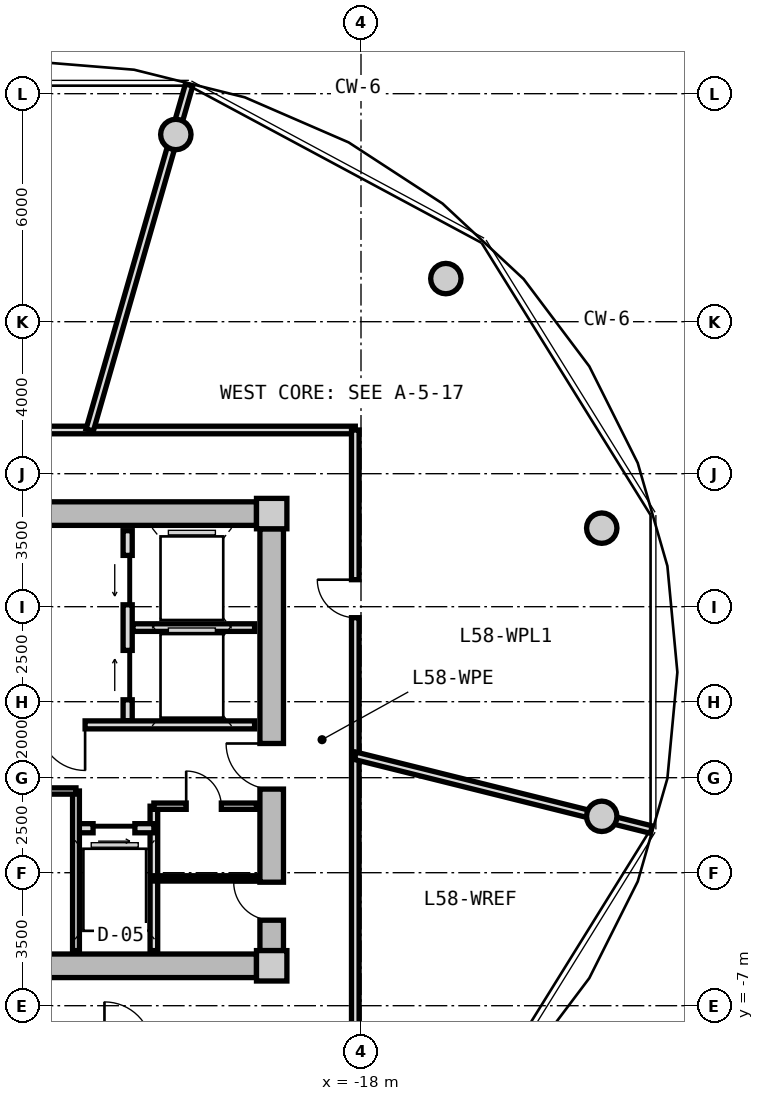
"""IFC4 building model, lengths in metres.
Left out: names, types, materials, properties, quantities, classifications, styles, units other than length and angle.
Written with IfcOpenShell. Run it as: python <this file> out.ifc"""

import sys

from ifc_helpers import new_model, si_unit, direction, frame, frame_2d, origin, origin_2d, place, context, subcontext, project, spatial, rectangle, circle, extrude, source, transform, mapped, element, fill, save


model = new_model("IFC4")
c1 = context("Model", 3, precision=1e-05, world=origin(), true_north=direction((0.0, 1.0)))
c2 = subcontext(c1, "Body", "Model", "MODEL_VIEW")
j1 = project(units=[si_unit("LENGTHUNIT", "METRE"), si_unit("PLANEANGLEUNIT", "RADIAN")], contexts=[c1])
p1 = place(None, origin())
s1 = spatial("IfcSite", under=j1, at=p1, CompositionType="ELEMENT")
p2 = place(p1, origin())
s2 = spatial("IfcBuilding", under=s1, at=p2, CompositionType="ELEMENT")
p3 = place(p2, frame((0.0, 0.0, 186.15)))
s3 = spatial("IfcBuildingStorey", under=s2, at=p3, CompositionType="ELEMENT", Elevation=186.15)
m1 = source(origin(), c2, "Body", "SweptSolid", [
    extrude(rectangle(XDim=0.8, YDim=0.8, at=origin_2d()), origin(), (0.0, 0.0, 1.0), 4.5),
])
for number, where, z_axis, x_axis in (
    (1, (-20.35, -5.95, 0.0), (0.0, 0.0, 1.0), (1.0, 0.0, 0.0)),
    (2, (-20.35, 5.95, 0.0), (0.0, 0.0, 1.0), (1.0, 0.0, 0.0)),
):
    element("IfcColumn", number, at=place(p3, frame(where, z_axis=z_axis, x_axis=x_axis)), inside=s3, PredefinedType="COLUMN", context=c2, shape_type="MappedRepresentation", body=[
        mapped(m1, transform((0.0, 0.0, 0.0), x_axis=(1.0, 0.0, 0.0), y_axis=(0.0, 1.0, 0.0), z_axis=(0.0, 0.0, 1.0), scale=1.0)),
    ])
m2 = source(origin(), c2, "Body", "SweptSolid", [
    extrude(rectangle(XDim=14.5, YDim=0.62, at=frame_2d((7.25, 0.0))), origin(), (0.0, 0.0, 1.0), 4.08),
])
for number, where, z_axis, x_axis in (
    (3, (-35.25, 5.95, 0.0), (0.0, 0.0, 1.0), (1.0, 0.0, 0.0)),
    (4, (-20.75, -5.95, 0.0), (0.0, 0.0, 1.0), (-1.0, 0.0, 0.0)),
):
    element("IfcWall", number, at=place(p3, frame(where, z_axis=z_axis, x_axis=x_axis)), inside=s3, PredefinedType="SHEAR", context=c2, shape_type="MappedRepresentation", body=[
        mapped(m2, transform((0.0, 0.0, 0.0), x_axis=(1.0, 0.0, 0.0), y_axis=(0.0, 1.0, 0.0), z_axis=(0.0, 0.0, 1.0), scale=1.0)),
    ])
m3 = source(origin(), c2, "Body", "SweptSolid", [
    extrude(rectangle(XDim=11.1, YDim=0.62, at=frame_2d((5.55, 0.0))), origin(), (0.0, 0.0, 1.0), 4.08),
])
p4 = place(p3, frame((-20.35, 5.55, 0.0), z_axis=(0.0, 0.0, 1.0), x_axis=(0.0, -1.0, 0.0)))
e5 = element("IfcWall", 5, at=p4, inside=s3, PredefinedType="SHEAR", context=c2, shape_type="MappedRepresentation", body=[
    mapped(m3, transform((0.0, 0.0, 0.0), x_axis=(1.0, 0.0, 0.0), y_axis=(0.0, 1.0, 0.0), z_axis=(0.0, 0.0, 1.0), scale=1.0)),
])
p5 = place(p4, frame((5.65, 0.0, 0.0)))
e6 = element("IfcOpeningElement", 6, at=p5, cuts=e5, PredefinedType="OPENING", context=c2, shape_type="SweptSolid", body=[
    extrude(rectangle(XDim=1.2, YDim=2.15, at=frame_2d((0.6, 1.075))), frame((0.0, 0.32, 0.0), z_axis=(0.0, -1.0, 0.0), x_axis=(1.0, 0.0, 0.0)), (0.0, 0.0, 1.0), 0.64),
])
p6 = place(p4, frame((9.3, 0.0, 0.0)))
e7 = element("IfcOpeningElement", 7, at=p6, cuts=e5, PredefinedType="OPENING", context=c2, shape_type="SweptSolid", body=[
    extrude(rectangle(XDim=1.0, YDim=2.1, at=frame_2d((0.5, 1.05))), frame((0.0, 0.32, 0.0), z_axis=(0.0, -1.0, 0.0), x_axis=(1.0, 0.0, 0.0)), (0.0, 0.0, 1.0), 0.64),
])
m4 = source(origin(), c2, "Body", "SweptSolid", [
    extrude(circle(Radius=0.4, at=origin_2d()), origin(), (0.0, 0.0, 1.0), 4.08),
])
for number, where, z_axis, x_axis in (
    (8, (-11.665, 5.567, 0.0), (0.0, 0.0, 1.0), (1.0, 0.0, 0.0)),
    (9, (-15.767, 12.135, 0.0), (0.0, 0.0, 1.0), (1.0, 0.0, 0.0)),
    (10, (-22.873, 15.926, 0.0), (0.0, 0.0, 1.0), (1.0, 0.0, 0.0)),
    (11, (-11.665, -2.016, 0.0), (0.0, 0.0, 1.0), (1.0, 0.0, 0.0)),
):
    element("IfcColumn", number, at=place(p3, frame(where, z_axis=z_axis, x_axis=x_axis)), inside=s3, PredefinedType="COLUMN", context=c2, shape_type="MappedRepresentation", body=[
        mapped(m4, transform((0.0, 0.0, 0.0), x_axis=(1.0, 0.0, 0.0), y_axis=(0.0, 1.0, 0.0), z_axis=(0.0, 0.0, 1.0), scale=1.0)),
    ])
m5 = source(origin(), c2, "Body", "SweptSolid", [
    extrude(rectangle(XDim=5.0, YDim=0.24, at=frame_2d((2.5, 0.0))), origin(), (0.0, 0.0, 1.0), 4.065),
])
p7 = place(p3, frame((-24.14, 0.5, 0.0), z_axis=(0.0, 0.0, 1.0), x_axis=(0.0, 1.0, 0.0)))
e12 = element("IfcWall", 12, at=p7, inside=s3, PredefinedType="PARTITIONING", context=c2, shape_type="MappedRepresentation", body=[
    mapped(m5, transform((0.0, 0.0, 0.0), x_axis=(1.0, 0.0, 0.0), y_axis=(0.0, 1.0, 0.0), z_axis=(0.0, 0.0, 1.0), scale=1.0)),
])
p8 = place(p7, frame((3.05, 0.0, 0.0)))
e13 = element("IfcOpeningElement", 13, at=p8, cuts=e12, PredefinedType="OPENING", context=c2, shape_type="SweptSolid", body=[
    extrude(rectangle(XDim=1.3, YDim=2.2, at=frame_2d((0.65, 1.1))), frame((0.0, 0.13, 0.0), z_axis=(0.0, -1.0, 0.0), x_axis=(1.0, 0.0, 0.0)), (0.0, 0.0, 1.0), 0.26),
])
p9 = place(p7, frame((0.55, 0.0, 0.0)))
e14 = element("IfcOpeningElement", 14, at=p9, cuts=e12, PredefinedType="OPENING", context=c2, shape_type="SweptSolid", body=[
    extrude(rectangle(XDim=1.3, YDim=2.2, at=frame_2d((0.65, 1.1))), frame((0.0, 0.13, 0.0), z_axis=(0.0, -1.0, 0.0), x_axis=(1.0, 0.0, 0.0)), (0.0, 0.0, 1.0), 0.26),
])
m6 = source(origin(), c2, "Body", "SweptSolid", [
    extrude(rectangle(XDim=3.2, YDim=0.2, at=frame_2d((1.6, 0.0))), origin(), (0.0, 0.0, 1.0), 4.065),
])
p10 = place(p3, frame((-24.0, 2.95, 0.0), z_axis=(0.0, 0.0, 1.0), x_axis=(1.0, 0.0, 0.0)))
e15 = element("IfcWall", 15, at=p10, inside=s3, PredefinedType="PARTITIONING", context=c2, shape_type="MappedRepresentation", body=[
    mapped(m6, transform((0.0, 0.0, 0.0), x_axis=(1.0, 0.0, 0.0), y_axis=(0.0, 1.0, 0.0), z_axis=(0.0, 0.0, 1.0), scale=1.0)),
])
m7 = source(origin(), c2, "Body", "SweptSolid", [
    extrude(rectangle(XDim=6.66, YDim=0.21, at=frame_2d((3.33, 0.0))), origin(), (0.0, 0.0, 1.0), 4.065),
])
p11 = place(p3, frame((-27.46, 0.39, 0.0), z_axis=(0.0, 0.0, 1.0), x_axis=(1.0, 0.0, 0.0)))
e16 = element("IfcWall", 16, at=p11, inside=s3, PredefinedType="PARTITIONING", context=c2, shape_type="MappedRepresentation", body=[
    mapped(m7, transform((0.0, 0.0, 0.0), x_axis=(1.0, 0.0, 0.0), y_axis=(0.0, 1.0, 0.0), z_axis=(0.0, 0.0, 1.0), scale=1.0)),
])
p12 = place(p11, frame((1.0, 0.0, 0.0)))
e17 = element("IfcOpeningElement", 17, at=p12, cuts=e16, PredefinedType="OPENING", context=c2, shape_type="SweptSolid", body=[
    extrude(rectangle(XDim=1.2, YDim=2.15, at=frame_2d((0.6, 1.075))), frame((0.0, 0.115, 0.0), z_axis=(0.0, -1.0, 0.0), x_axis=(1.0, 0.0, 0.0)), (0.0, 0.0, 1.0), 0.23),
])
m8 = source(origin(), c2, "Body", "SweptSolid", [
    extrude(rectangle(XDim=3.8, YDim=0.2, at=frame_2d((1.9, 0.0))), origin(), (0.0, 0.0, 1.0), 4.065),
])
p13 = place(p3, frame((-23.45, -5.55, 0.0), z_axis=(0.0, 0.0, 1.0), x_axis=(0.0, 1.0, 0.0)))
e18 = element("IfcWall", 18, at=p13, inside=s3, PredefinedType="PARTITIONING", context=c2, shape_type="MappedRepresentation", body=[
    mapped(m8, transform((0.0, 0.0, 0.0), x_axis=(1.0, 0.0, 0.0), y_axis=(0.0, 1.0, 0.0), z_axis=(0.0, 0.0, 1.0), scale=1.0)),
])
m9 = source(origin(), c2, "Body", "SweptSolid", [
    extrude(rectangle(XDim=2.05, YDim=0.24, at=frame_2d((1.025, 0.0))), origin(), (0.0, 0.0, 1.0), 4.065),
])
p14 = place(p3, frame((-25.5, -2.33, 0.0), z_axis=(0.0, 0.0, 1.0), x_axis=(1.0, 0.0, 0.0)))
e19 = element("IfcWall", 19, at=p14, inside=s3, PredefinedType="PARTITIONING", context=c2, shape_type="MappedRepresentation", body=[
    mapped(m9, transform((0.0, 0.0, 0.0), x_axis=(1.0, 0.0, 0.0), y_axis=(0.0, 1.0, 0.0), z_axis=(0.0, 0.0, 1.0), scale=1.0)),
])
p15 = place(p14, frame((0.45, 0.0, 0.0)))
e20 = element("IfcOpeningElement", 20, at=p15, cuts=e19, PredefinedType="OPENING", context=c2, shape_type="SweptSolid", body=[
    extrude(rectangle(XDim=1.1, YDim=2.2, at=frame_2d((0.55, 1.1))), frame((0.0, 0.13, 0.0), z_axis=(0.0, -1.0, 0.0), x_axis=(1.0, 0.0, 0.0)), (0.0, 0.0, 1.0), 0.26),
])
m10 = source(origin(), c2, "Body", "SweptSolid", [
    extrude(rectangle(XDim=4.2, YDim=0.18, at=frame_2d((2.1, 0.0))), origin(), (0.0, 0.0, 1.0), 4.065),
])
p16 = place(p3, frame((-25.5, -5.55, 0.0), z_axis=(0.0, 0.0, 1.0), x_axis=(0.0, 1.0, 0.0)))
e21 = element("IfcWall", 21, at=p16, inside=s3, PredefinedType="PARTITIONING", context=c2, shape_type="MappedRepresentation", body=[
    mapped(m10, transform((0.0, 0.0, 0.0), x_axis=(1.0, 0.0, 0.0), y_axis=(0.0, 1.0, 0.0), z_axis=(0.0, 0.0, 1.0), scale=1.0)),
])
m11 = source(origin(), c2, "Body", "SweptSolid", [
    extrude(rectangle(XDim=4.77, YDim=0.165, at=frame_2d((2.385, 0.0))), origin(), (0.0, 0.0, 1.0), 4.065),
])
p17 = place(p3, frame((-30.27, -1.35, 0.0), z_axis=(0.0, 0.0, 1.0), x_axis=(1.0, 0.0, 0.0)))
e22 = element("IfcWall", 22, at=p17, inside=s3, PredefinedType="PARTITIONING", context=c2, shape_type="MappedRepresentation", body=[
    mapped(m11, transform((0.0, 0.0, 0.0), x_axis=(1.0, 0.0, 0.0), y_axis=(0.0, 1.0, 0.0), z_axis=(0.0, 0.0, 1.0), scale=1.0)),
])
p18 = place(p17, frame((1.85, 0.0, 0.0)))
e23 = element("IfcOpeningElement", 23, at=p18, cuts=e22, PredefinedType="OPENING", context=c2, shape_type="SweptSolid", body=[
    extrude(rectangle(XDim=1.0, YDim=2.1, at=frame_2d((0.5, 1.05))), frame((0.0, 0.093, 0.0), z_axis=(0.0, -1.0, 0.0), x_axis=(1.0, 0.0, 0.0)), (0.0, 0.0, 1.0), 0.185),
])
m12 = source(origin(), c2, "Body", "SweptSolid", [
    extrude(rectangle(XDim=2.7, YDim=0.165, at=frame_2d((1.35, 0.0))), origin(), (0.0, 0.0, 1.0), 4.065),
])
p19 = place(p3, frame((-23.45, -1.75, 0.0), z_axis=(0.0, 0.0, 1.0), x_axis=(1.0, 0.0, 0.0)))
e24 = element("IfcWall", 24, at=p19, inside=s3, PredefinedType="PARTITIONING", context=c2, shape_type="MappedRepresentation", body=[
    mapped(m12, transform((0.0, 0.0, 0.0), x_axis=(1.0, 0.0, 0.0), y_axis=(0.0, 1.0, 0.0), z_axis=(0.0, 0.0, 1.0), scale=1.0)),
])
p20 = place(p19, frame((0.85, 0.0, 0.0)))
e25 = element("IfcOpeningElement", 25, at=p20, cuts=e24, PredefinedType="OPENING", context=c2, shape_type="SweptSolid", body=[
    extrude(rectangle(XDim=0.925, YDim=2.1, at=frame_2d((0.462, 1.05))), frame((0.0, 0.093, 0.0), z_axis=(0.0, -1.0, 0.0), x_axis=(1.0, 0.0, 0.0)), (0.0, 0.0, 1.0), 0.185),
])
m13 = source(origin(), c2, "Body", "SweptSolid", [
    extrude(rectangle(XDim=2.7, YDim=0.14, at=frame_2d((1.35, 0.0))), origin(), (0.0, 0.0, 1.0), 4.065),
])
p21 = place(p3, frame((-23.45, -3.65, 0.0), z_axis=(0.0, 0.0, 1.0), x_axis=(1.0, 0.0, 0.0)))
e26 = element("IfcWall", 26, at=p21, inside=s3, PredefinedType="PARTITIONING", context=c2, shape_type="MappedRepresentation", body=[
    mapped(m13, transform((0.0, 0.0, 0.0), x_axis=(1.0, 0.0, 0.0), y_axis=(0.0, 1.0, 0.0), z_axis=(0.0, 0.0, 1.0), scale=1.0)),
])
m14 = source(origin(), c2, "Body", "SweptSolid", [
    extrude(rectangle(XDim=19.7, YDim=0.2, at=frame_2d((9.85, 0.0))), origin(), (0.0, 0.0, 1.0), 4.065),
])
p22 = place(p3, frame((-37.85, 8.15, 0.0), z_axis=(0.0, 0.0, 1.0), x_axis=(1.0, 0.0, 0.0)))
e27 = element("IfcWall", 27, at=p22, inside=s3, PredefinedType="PARTITIONING", context=c2, shape_type="MappedRepresentation", body=[
    mapped(m14, transform((0.0, 0.0, 0.0), x_axis=(1.0, 0.0, 0.0), y_axis=(0.0, 1.0, 0.0), z_axis=(0.0, 0.0, 1.0), scale=1.0)),
])
p23 = place(p22, frame((5.993, 0.0, 0.0)))
e28 = element("IfcOpeningElement", 28, at=p23, cuts=e27, PredefinedType="OPENING", context=c2, shape_type="SweptSolid", body=[
    extrude(rectangle(XDim=1.0, YDim=2.1, at=frame_2d((0.5, 1.05))), frame((0.0, 0.11, 0.0), z_axis=(0.0, -1.0, 0.0), x_axis=(1.0, 0.0, 0.0)), (0.0, 0.0, 1.0), 0.22),
])
m15 = source(origin(), c2, "Body", "SweptSolid", [
    extrude(rectangle(XDim=16.3, YDim=0.2, at=frame_2d((8.15, 0.0))), origin(), (0.0, 0.0, 1.0), 4.065),
])
p24 = place(p3, frame((-18.15, 8.15, 0.0), z_axis=(0.0, 0.0, 1.0), x_axis=(0.0, -1.0, 0.0)))
e29 = element("IfcWall", 29, at=p24, inside=s3, PredefinedType="PARTITIONING", context=c2, shape_type="MappedRepresentation", body=[
    mapped(m15, transform((0.0, 0.0, 0.0), x_axis=(1.0, 0.0, 0.0), y_axis=(0.0, 1.0, 0.0), z_axis=(0.0, 0.0, 1.0), scale=1.0)),
])
p25 = place(p24, frame((3.939, 0.0, 0.0)))
e30 = element("IfcOpeningElement", 30, at=p25, cuts=e29, PredefinedType="OPENING", context=c2, shape_type="SweptSolid", body=[
    extrude(rectangle(XDim=1.0, YDim=2.1, at=frame_2d((0.5, 1.05))), frame((0.0, 0.11, 0.0), z_axis=(0.0, -1.0, 0.0), x_axis=(1.0, 0.0, 0.0)), (0.0, 0.0, 1.0), 0.22),
])
m16 = source(origin(), c2, "Body", "SweptSolid", [
    extrude(rectangle(XDim=8.027, YDim=0.2, at=frame_2d((4.014, 0.0))), origin(), (0.0, 0.0, 1.0), 4.065),
])
p26 = place(p3, frame((-18.15, -0.424, 0.0), z_axis=(0.0, 0.0, 1.0), x_axis=(0.970312225041, -0.241855713053, 0.0)))
e31 = element("IfcWall", 31, at=p26, inside=s3, PredefinedType="PARTITIONING", context=c2, shape_type="MappedRepresentation", body=[
    mapped(m16, transform((0.0, 0.0, 0.0), x_axis=(1.0, 0.0, 0.0), y_axis=(0.0, 1.0, 0.0), z_axis=(0.0, 0.0, 1.0), scale=1.0)),
])
m17 = source(origin(), c2, "Body", "SweptSolid", [
    extrude(rectangle(XDim=9.449, YDim=0.2, at=frame_2d((4.725, 0.0))), origin(), (0.0, 0.0, 1.0), 2.515),
])
p27 = place(p3, frame((-25.139, 8.15, 0.0), z_axis=(0.0, 0.0, 1.0), x_axis=(0.276808823174, 0.960925010296, 0.0)))
e32 = element("IfcWall", 32, at=p27, inside=s3, PredefinedType="PARTITIONING", context=c2, shape_type="MappedRepresentation", body=[
    mapped(m17, transform((0.0, 0.0, 0.0), x_axis=(1.0, 0.0, 0.0), y_axis=(0.0, 1.0, 0.0), z_axis=(0.0, 0.0, 1.0), scale=1.0)),
])
m18 = source(origin(), c2, "Body", "SweptSolid", [
    extrude(rectangle(XDim=1.3, YDim=2.2, at=frame_2d((0.65, 1.1))), frame((0.0, 0.025, 0.0), z_axis=(0.0, -1.0, 0.0), x_axis=(1.0, 0.0, 0.0)), (0.0, 0.0, 1.0), 0.05),
])
p28 = place(p8, origin())
e33 = element("IfcDoor", 33, at=p28, inside=s3, OperationType="SLIDING_TO_LEFT", PredefinedType="DOOR", context=c2, shape_type="MappedRepresentation", body=[
    mapped(m18, transform((0.0, 0.0, 0.0), x_axis=(1.0, 0.0, 0.0), y_axis=(0.0, 1.0, 0.0), z_axis=(0.0, 0.0, 1.0), scale=1.0)),
])
fill(e13, e33)
p29 = place(p9, origin())
e34 = element("IfcDoor", 34, at=p29, inside=s3, OperationType="SLIDING_TO_RIGHT", PredefinedType="DOOR", context=c2, shape_type="MappedRepresentation", body=[
    mapped(m18, transform((0.0, 0.0, 0.0), x_axis=(1.0, 0.0, 0.0), y_axis=(0.0, 1.0, 0.0), z_axis=(0.0, 0.0, 1.0), scale=1.0)),
])
fill(e14, e34)
m19 = source(origin(), c2, "Body", "SweptSolid", [
    extrude(rectangle(XDim=1.2, YDim=2.15, at=frame_2d((0.6, 1.075))), frame((0.0, 0.025, 0.0), z_axis=(0.0, -1.0, 0.0), x_axis=(1.0, 0.0, 0.0)), (0.0, 0.0, 1.0), 0.05),
])
p30 = place(p12, frame((1.2, 0.0, 0.0), z_axis=(0.0, 0.0, 1.0), x_axis=(-1.0, 0.0, 0.0)))
e35 = element("IfcDoor", 35, at=p30, inside=s3, OperationType="SINGLE_SWING_LEFT", PredefinedType="DOOR", context=c2, shape_type="MappedRepresentation", body=[
    mapped(m19, transform((0.0, 0.0, 0.0), x_axis=(1.0, 0.0, 0.0), y_axis=(0.0, 1.0, 0.0), z_axis=(0.0, 0.0, 1.0), scale=1.0)),
])
fill(e17, e35)
p31 = place(p5, frame((1.2, 0.0, 0.0), z_axis=(0.0, 0.0, 1.0), x_axis=(-1.0, 0.0, 0.0)))
e36 = element("IfcDoor", 36, at=p31, inside=s3, OperationType="SINGLE_SWING_RIGHT", PredefinedType="DOOR", context=c2, shape_type="MappedRepresentation", body=[
    mapped(m19, transform((0.0, 0.0, 0.0), x_axis=(1.0, 0.0, 0.0), y_axis=(0.0, 1.0, 0.0), z_axis=(0.0, 0.0, 1.0), scale=1.0)),
])
fill(e6, e36)
m20 = source(origin(), c2, "Body", "SweptSolid", [
    extrude(rectangle(XDim=1.1, YDim=2.2, at=frame_2d((0.55, 1.1))), frame((0.0, 0.025, 0.0), z_axis=(0.0, -1.0, 0.0), x_axis=(1.0, 0.0, 0.0)), (0.0, 0.0, 1.0), 0.05),
])
p32 = place(p15, frame((1.1, 0.0, 0.0), z_axis=(0.0, 0.0, 1.0), x_axis=(-1.0, 0.0, 0.0)))
e37 = element("IfcDoor", 37, at=p32, inside=s3, OperationType="SLIDING_TO_RIGHT", PredefinedType="DOOR", context=c2, shape_type="MappedRepresentation", body=[
    mapped(m20, transform((0.0, 0.0, 0.0), x_axis=(1.0, 0.0, 0.0), y_axis=(0.0, 1.0, 0.0), z_axis=(0.0, 0.0, 1.0), scale=1.0)),
])
fill(e20, e37)
m21 = source(origin(), c2, "Body", "SweptSolid", [
    extrude(rectangle(XDim=0.925, YDim=2.1, at=frame_2d((0.462, 1.05))), frame((0.0, 0.025, 0.0), z_axis=(0.0, -1.0, 0.0), x_axis=(1.0, 0.0, 0.0)), (0.0, 0.0, 1.0), 0.05),
])
p33 = place(p20, origin())
e38 = element("IfcDoor", 38, at=p33, inside=s3, OperationType="SINGLE_SWING_LEFT", PredefinedType="DOOR", context=c2, shape_type="MappedRepresentation", body=[
    mapped(m21, transform((0.0, 0.0, 0.0), x_axis=(1.0, 0.0, 0.0), y_axis=(0.0, 1.0, 0.0), z_axis=(0.0, 0.0, 1.0), scale=1.0)),
])
fill(e25, e38)
m22 = source(origin(), c2, "Body", "SweptSolid", [
    extrude(rectangle(XDim=1.0, YDim=2.1, at=frame_2d((0.5, 1.05))), frame((0.0, 0.025, 0.0), z_axis=(0.0, -1.0, 0.0), x_axis=(1.0, 0.0, 0.0)), (0.0, 0.0, 1.0), 0.05),
])
p34 = place(p6, frame((1.0, 0.0, 0.0), z_axis=(0.0, 0.0, 1.0), x_axis=(-1.0, 0.0, 0.0)))
e39 = element("IfcDoor", 39, at=p34, inside=s3, OperationType="SINGLE_SWING_RIGHT", PredefinedType="DOOR", context=c2, shape_type="MappedRepresentation", body=[
    mapped(m22, transform((0.0, 0.0, 0.0), x_axis=(1.0, 0.0, 0.0), y_axis=(0.0, 1.0, 0.0), z_axis=(0.0, 0.0, 1.0), scale=1.0)),
])
fill(e7, e39)
p35 = place(p25, frame((1.0, 0.0, 0.0), z_axis=(0.0, 0.0, 1.0), x_axis=(-1.0, 0.0, 0.0)))
e40 = element("IfcDoor", 40, at=p35, inside=s3, OperationType="SINGLE_SWING_RIGHT", PredefinedType="DOOR", context=c2, shape_type="MappedRepresentation", body=[
    mapped(m22, transform((0.0, 0.0, 0.0), x_axis=(1.0, 0.0, 0.0), y_axis=(0.0, 1.0, 0.0), z_axis=(0.0, 0.0, 1.0), scale=1.0)),
])
fill(e30, e40)
save(model, sys.argv[1])
